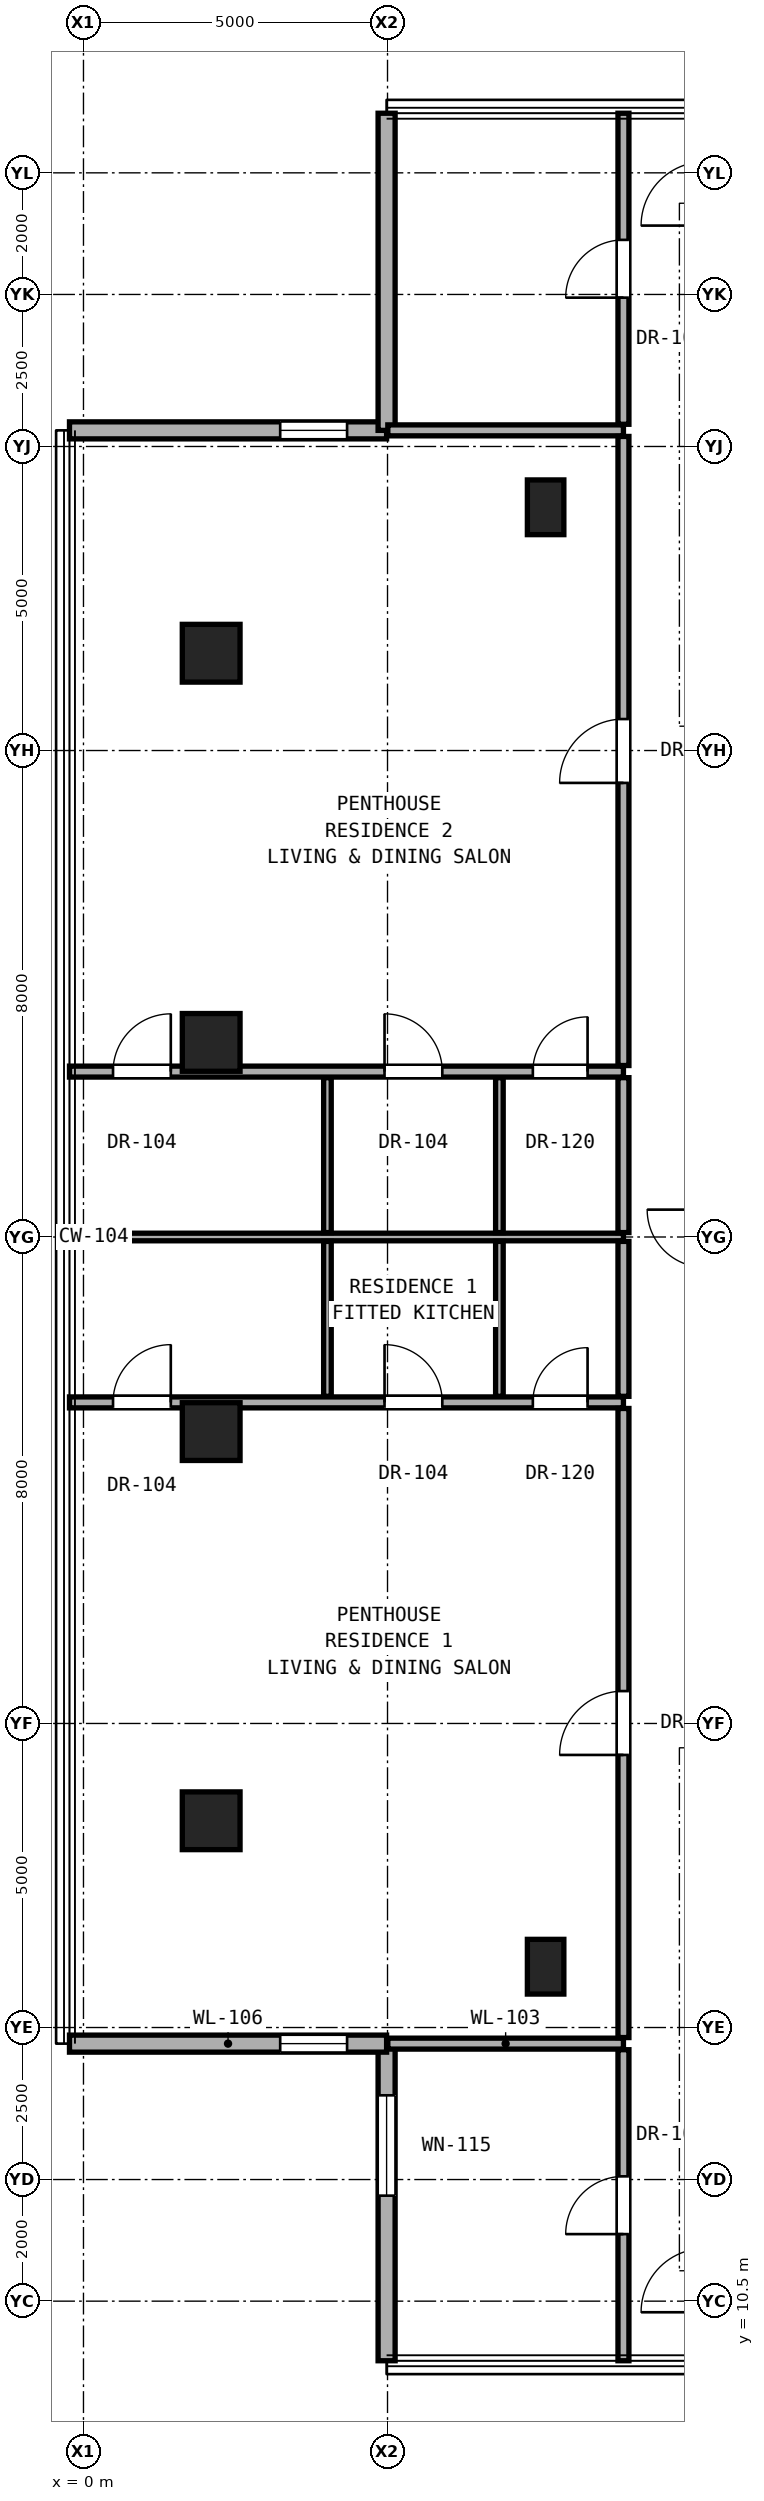
"""IFC4 building model, lengths in metres.
Left out: names, types, materials, properties, quantities, classifications, styles, units other than length and angle.
Written with IfcOpenShell. Run it as: python <this file> out.ifc"""

import sys

from ifc_helpers import new_model, si_unit, direction, frame, frame_2d, origin, origin_2d, place, context, subcontext, project, spatial, rectangle, hollow_rectangle, extrude, element, fill, save


model = new_model("IFC4")
c1 = context("Model", 3, precision=1e-05, world=origin(), true_north=direction((0.0, 1.0)))
c2 = subcontext(c1, "Body", "Model", "MODEL_VIEW")
j1 = project(units=[si_unit("LENGTHUNIT", "METRE"), si_unit("PLANEANGLEUNIT", "RADIAN")], contexts=[c1])
p1 = place(None, origin())
s1 = spatial("IfcSite", under=j1, at=p1, CompositionType="ELEMENT")
p2 = place(p1, origin())
s2 = spatial("IfcBuilding", under=s1, at=p2, CompositionType="ELEMENT")
p3 = place(p2, frame((0.0, 0.0, 199.9)))
s3 = spatial("IfcBuildingStorey", under=s2, at=p3, CompositionType="ELEMENT", Elevation=199.9)
for number, where, z_axis, x_axis in (
    (1, (2.1, 18.4, 0.0), (0.0, 0.0, 1.0), (1.0, 0.0, 0.0)),
    (2, (2.1, 24.8, 0.0), (0.0, 0.0, 1.0), (1.0, 0.0, 0.0)),
    (3, (2.1, 31.2, 0.0), (0.0, 0.0, 1.0), (1.0, 0.0, 0.0)),
    (4, (2.1, 37.6, 0.0), (0.0, 0.0, 1.0), (1.0, 0.0, 0.0)),
):
    element("IfcColumn", number, at=place(p3, frame(where, z_axis=z_axis, x_axis=x_axis)), inside=s3, PredefinedType="COLUMN", context=c2, shape_type="SweptSolid", body=[
        extrude(hollow_rectangle(XDim=0.95, YDim=0.95, WallThickness=0.05, at=origin_2d()), origin(), (0.0, 0.0, 1.0), 3.25),
    ])
for number, where, z_axis, x_axis in (
    (5, (7.6, 16.0, 0.0), (0.0, 0.0, 1.0), (1.0, 0.0, 0.0)),
    (6, (7.6, 40.0, 0.0), (0.0, 0.0, 1.0), (1.0, 0.0, 0.0)),
):
    element("IfcColumn", number, at=place(p3, frame(where, z_axis=z_axis, x_axis=x_axis)), inside=s3, PredefinedType="PILASTER", context=c2, shape_type="SweptSolid", body=[
        extrude(rectangle(XDim=0.6, YDim=0.9, at=origin_2d()), origin(), (0.0, 0.0, 1.0), 3.25),
    ])
p4 = place(p3, frame((4.985, 14.735, 0.0), z_axis=(0.0, 0.0, 1.0), x_axis=(0.0, -1.0, 0.0)))
e7 = element("IfcWall", 7, at=p4, inside=s3, PredefinedType="SOLIDWALL", context=c2, shape_type="SweptSolid", body=[
    extrude(rectangle(XDim=5.215, YDim=0.28, at=frame_2d((2.607, 0.0))), origin(), (0.0, 0.0, 1.0), 3.03),
])
p5 = place(p4, frame((0.85, 0.0, 0.68)))
e8 = element("IfcOpeningElement", 8, at=p5, cuts=e7, PredefinedType="OPENING", context=c2, shape_type="SweptSolid", body=[
    extrude(rectangle(XDim=1.65, YDim=2.2, at=frame_2d((0.825, 1.1))), frame((0.0, 0.15, 0.0), z_axis=(0.0, -1.0, 0.0), x_axis=(1.0, 0.0, 0.0)), (0.0, 0.0, 1.0), 0.3),
])
p6 = place(p3, frame((-0.23, 14.735, 0.0), z_axis=(0.0, 0.0, 1.0), x_axis=(1.0, 0.0, 0.0)))
e9 = element("IfcWall", 9, at=p6, inside=s3, PredefinedType="SOLIDWALL", context=c2, shape_type="SweptSolid", body=[
    extrude(rectangle(XDim=5.215, YDim=0.28, at=frame_2d((2.607, 0.0))), origin(), (0.0, 0.0, 1.0), 3.03),
])
p7 = place(p6, frame((3.465, 0.0, 0.85)))
e10 = element("IfcOpeningElement", 10, at=p7, cuts=e9, PredefinedType="OPENING", context=c2, shape_type="SweptSolid", body=[
    extrude(rectangle(XDim=1.1, YDim=2.0, at=frame_2d((0.55, 1.0))), frame((0.0, 0.15, 0.0), z_axis=(0.0, -1.0, 0.0), x_axis=(1.0, 0.0, 0.0)), (0.0, 0.0, 1.0), 0.3),
])
p8 = place(p3, frame((4.985, 41.265, 0.0), z_axis=(0.0, 0.0, 1.0), x_axis=(-1.0, 0.0, 0.0)))
e11 = element("IfcWall", 11, at=p8, inside=s3, PredefinedType="SOLIDWALL", context=c2, shape_type="SweptSolid", body=[
    extrude(rectangle(XDim=5.215, YDim=0.28, at=frame_2d((2.607, 0.0))), origin(), (0.0, 0.0, 1.0), 3.03),
])
p9 = place(p8, frame((0.65, 0.0, 0.85)))
e12 = element("IfcOpeningElement", 12, at=p9, cuts=e11, PredefinedType="OPENING", context=c2, shape_type="SweptSolid", body=[
    extrude(rectangle(XDim=1.1, YDim=2.0, at=frame_2d((0.55, 1.0))), frame((0.0, 0.15, 0.0), z_axis=(0.0, -1.0, 0.0), x_axis=(1.0, 0.0, 0.0)), (0.0, 0.0, 1.0), 0.3),
])
p10 = place(p3, frame((4.985, 46.48, 0.0), z_axis=(0.0, 0.0, 1.0), x_axis=(0.0, -1.0, 0.0)))
e13 = element("IfcWall", 13, at=p10, inside=s3, PredefinedType="SOLIDWALL", context=c2, shape_type="SweptSolid", body=[
    extrude(rectangle(XDim=5.215, YDim=0.28, at=frame_2d((2.607, 0.0))), origin(), (0.0, 0.0, 1.0), 3.03),
])
p11 = place(p3, frame((5.005, 14.735, 0.0), z_axis=(0.0, 0.0, 1.0), x_axis=(1.0, 0.0, 0.0)))
e14 = element("IfcWall", 14, at=p11, inside=s3, PredefinedType="PARTITIONING", context=c2, shape_type="SweptSolid", body=[
    extrude(rectangle(XDim=3.875, YDim=0.18, at=frame_2d((1.938, 0.0))), origin(), (0.0, 0.0, 1.0), 3.05),
])
p12 = place(p3, frame((-0.23, 25.28, 0.0), z_axis=(0.0, 0.0, 1.0), x_axis=(1.0, 0.0, 0.0)))
e15 = element("IfcWall", 15, at=p12, inside=s3, PredefinedType="PARTITIONING", context=c2, shape_type="SweptSolid", body=[
    extrude(rectangle(XDim=9.11, YDim=0.18, at=frame_2d((4.555, 0.0))), origin(), (0.0, 0.0, 1.0), 2.269),
])
p13 = place(p12, frame((0.716, 0.0, 0.0)))
e16 = element("IfcOpeningElement", 16, at=p13, cuts=e15, PredefinedType="OPENING", context=c2, shape_type="SweptSolid", body=[
    extrude(rectangle(XDim=0.95, YDim=2.15, at=frame_2d((0.475, 1.075))), frame((0.0, 0.1, 0.0), z_axis=(0.0, -1.0, 0.0), x_axis=(1.0, 0.0, 0.0)), (0.0, 0.0, 1.0), 0.2),
])
p14 = place(p12, frame((5.181, 0.0, 0.0)))
e17 = element("IfcOpeningElement", 17, at=p14, cuts=e15, PredefinedType="OPENING", context=c2, shape_type="SweptSolid", body=[
    extrude(rectangle(XDim=0.95, YDim=2.15, at=frame_2d((0.475, 1.075))), frame((0.0, 0.1, 0.0), z_axis=(0.0, -1.0, 0.0), x_axis=(1.0, 0.0, 0.0)), (0.0, 0.0, 1.0), 0.2),
])
p15 = place(p12, frame((7.62, 0.0, 0.0)))
e18 = element("IfcOpeningElement", 18, at=p15, cuts=e15, PredefinedType="OPENING", context=c2, shape_type="SweptSolid", body=[
    extrude(rectangle(XDim=0.9, YDim=2.1, at=frame_2d((0.45, 1.05))), frame((0.0, 0.1, 0.0), z_axis=(0.0, -1.0, 0.0), x_axis=(1.0, 0.0, 0.0)), (0.0, 0.0, 1.0), 0.2),
])
p16 = place(p3, frame((-0.23, 28.0, 0.0), z_axis=(0.0, 0.0, 1.0), x_axis=(1.0, 0.0, 0.0)))
e19 = element("IfcWall", 19, at=p16, inside=s3, PredefinedType="PARTITIONING", context=c2, shape_type="SweptSolid", body=[
    extrude(rectangle(XDim=9.11, YDim=0.125, at=frame_2d((4.555, 0.0))), origin(), (0.0, 0.0, 1.0), 2.269),
])
p17 = place(p3, frame((-0.23, 30.72, 0.0), z_axis=(0.0, 0.0, 1.0), x_axis=(1.0, 0.0, 0.0)))
e20 = element("IfcWall", 20, at=p17, inside=s3, PredefinedType="PARTITIONING", context=c2, shape_type="SweptSolid", body=[
    extrude(rectangle(XDim=9.11, YDim=0.18, at=frame_2d((4.555, 0.0))), origin(), (0.0, 0.0, 1.0), 2.269),
])
p18 = place(p17, frame((0.716, 0.0, 0.0)))
e21 = element("IfcOpeningElement", 21, at=p18, cuts=e20, PredefinedType="OPENING", context=c2, shape_type="SweptSolid", body=[
    extrude(rectangle(XDim=0.95, YDim=2.15, at=frame_2d((0.475, 1.075))), frame((0.0, 0.1, 0.0), z_axis=(0.0, -1.0, 0.0), x_axis=(1.0, 0.0, 0.0)), (0.0, 0.0, 1.0), 0.2),
])
p19 = place(p17, frame((5.181, 0.0, 0.0)))
e22 = element("IfcOpeningElement", 22, at=p19, cuts=e20, PredefinedType="OPENING", context=c2, shape_type="SweptSolid", body=[
    extrude(rectangle(XDim=0.95, YDim=2.15, at=frame_2d((0.475, 1.075))), frame((0.0, 0.1, 0.0), z_axis=(0.0, -1.0, 0.0), x_axis=(1.0, 0.0, 0.0)), (0.0, 0.0, 1.0), 0.2),
])
p20 = place(p17, frame((7.62, 0.0, 0.0)))
e23 = element("IfcOpeningElement", 23, at=p20, cuts=e20, PredefinedType="OPENING", context=c2, shape_type="SweptSolid", body=[
    extrude(rectangle(XDim=0.9, YDim=2.1, at=frame_2d((0.45, 1.05))), frame((0.0, 0.1, 0.0), z_axis=(0.0, -1.0, 0.0), x_axis=(1.0, 0.0, 0.0)), (0.0, 0.0, 1.0), 0.2),
])
p21 = place(p3, frame((5.005, 41.265, 0.0), z_axis=(0.0, 0.0, 1.0), x_axis=(1.0, 0.0, 0.0)))
e24 = element("IfcWall", 24, at=p21, inside=s3, PredefinedType="PARTITIONING", context=c2, shape_type="SweptSolid", body=[
    extrude(rectangle(XDim=3.875, YDim=0.18, at=frame_2d((1.938, 0.0))), origin(), (0.0, 0.0, 1.0), 3.05),
])
for number, where, z_axis, x_axis in (
    (25, (4.012, 25.38, 0.0), (0.0, 0.0, 1.0), (0.0, 1.0, 0.0)),
    (26, (4.012, 28.073, 0.0), (0.0, 0.0, 1.0), (0.0, 1.0, 0.0)),
    (27, (6.84, 25.38, 0.0), (0.0, 0.0, 1.0), (0.0, 1.0, 0.0)),
    (28, (6.84, 28.073, 0.0), (0.0, 0.0, 1.0), (0.0, 1.0, 0.0)),
):
    element("IfcWall", number, at=place(p3, frame(where, z_axis=z_axis, x_axis=x_axis)), inside=s3, PredefinedType="PARTITIONING", context=c2, shape_type="SweptSolid", body=[
        extrude(rectangle(XDim=2.548, YDim=0.125, at=frame_2d((1.274, 0.0))), origin(), (0.0, 0.0, 1.0), 3.05),
    ])
p22 = place(p3, frame((8.88, 9.52, 0.0), z_axis=(0.0, 0.0, 1.0), x_axis=(0.0, 1.0, 0.0)))
e29 = element("IfcWall", 29, at=p22, inside=s3, PredefinedType="PARTITIONING", context=c2, shape_type="SweptSolid", body=[
    extrude(rectangle(XDim=5.115, YDim=0.18, at=frame_2d((2.558, 0.0))), origin(), (0.0, 0.0, 1.0), 3.05),
])
p23 = place(p22, frame((2.083, 0.0, 0.0)))
e30 = element("IfcOpeningElement", 30, at=p23, cuts=e29, PredefinedType="OPENING", context=c2, shape_type="SweptSolid", body=[
    extrude(rectangle(XDim=0.95, YDim=2.15, at=frame_2d((0.475, 1.075))), frame((0.0, 0.1, 0.0), z_axis=(0.0, -1.0, 0.0), x_axis=(1.0, 0.0, 0.0)), (0.0, 0.0, 1.0), 0.2),
])
p24 = place(p3, frame((8.88, 14.835, 0.0), z_axis=(0.0, 0.0, 1.0), x_axis=(0.0, 1.0, 0.0)))
e31 = element("IfcWall", 31, at=p24, inside=s3, PredefinedType="PARTITIONING", context=c2, shape_type="SweptSolid", body=[
    extrude(rectangle(XDim=10.345, YDim=0.18, at=frame_2d((5.172, 0.0))), origin(), (0.0, 0.0, 1.0), 2.346),
])
p25 = place(p24, frame((4.647, 0.0, 0.0)))
e32 = element("IfcOpeningElement", 32, at=p25, cuts=e31, PredefinedType="OPENING", context=c2, shape_type="SweptSolid", body=[
    extrude(rectangle(XDim=1.05, YDim=2.2, at=frame_2d((0.525, 1.1))), frame((0.0, 0.1, 0.0), z_axis=(0.0, -1.0, 0.0), x_axis=(1.0, 0.0, 0.0)), (0.0, 0.0, 1.0), 0.2),
])
for number, where, z_axis, x_axis in (
    (33, (8.88, 25.38, 0.0), (0.0, 0.0, 1.0), (0.0, 1.0, 0.0)),
    (34, (8.88, 28.073, 0.0), (0.0, 0.0, 1.0), (0.0, 1.0, 0.0)),
):
    element("IfcWall", number, at=place(p3, frame(where, z_axis=z_axis, x_axis=x_axis)), inside=s3, PredefinedType="PARTITIONING", context=c2, shape_type="SweptSolid", body=[
        extrude(rectangle(XDim=2.548, YDim=0.18, at=frame_2d((1.274, 0.0))), origin(), (0.0, 0.0, 1.0), 3.05),
    ])
p26 = place(p3, frame((8.88, 30.82, 0.0), z_axis=(0.0, 0.0, 1.0), x_axis=(0.0, 1.0, 0.0)))
e35 = element("IfcWall", 35, at=p26, inside=s3, PredefinedType="PARTITIONING", context=c2, shape_type="SweptSolid", body=[
    extrude(rectangle(XDim=10.345, YDim=0.18, at=frame_2d((5.172, 0.0))), origin(), (0.0, 0.0, 1.0), 2.346),
])
p27 = place(p26, frame((4.647, 0.0, 0.0)))
e36 = element("IfcOpeningElement", 36, at=p27, cuts=e35, PredefinedType="OPENING", context=c2, shape_type="SweptSolid", body=[
    extrude(rectangle(XDim=1.05, YDim=2.2, at=frame_2d((0.525, 1.1))), frame((0.0, 0.1, 0.0), z_axis=(0.0, -1.0, 0.0), x_axis=(1.0, 0.0, 0.0)), (0.0, 0.0, 1.0), 0.2),
])
p28 = place(p3, frame((8.88, 41.365, 0.0), z_axis=(0.0, 0.0, 1.0), x_axis=(0.0, 1.0, 0.0)))
e37 = element("IfcWall", 37, at=p28, inside=s3, PredefinedType="PARTITIONING", context=c2, shape_type="SweptSolid", body=[
    extrude(rectangle(XDim=5.115, YDim=0.18, at=frame_2d((2.558, 0.0))), origin(), (0.0, 0.0, 1.0), 3.05),
])
p29 = place(p28, frame((2.083, 0.0, 0.0)))
e38 = element("IfcOpeningElement", 38, at=p29, cuts=e37, PredefinedType="OPENING", context=c2, shape_type="SweptSolid", body=[
    extrude(rectangle(XDim=0.95, YDim=2.15, at=frame_2d((0.475, 1.075))), frame((0.0, 0.1, 0.0), z_axis=(0.0, -1.0, 0.0), x_axis=(1.0, 0.0, 0.0)), (0.0, 0.0, 1.0), 0.2),
])
p30 = place(p5, origin())
e39 = element("IfcWindow", 39, at=p30, inside=s3, PartitioningType="SINGLE_PANEL", PredefinedType="WINDOW", context=c2, shape_type="SweptSolid", body=[
    extrude(rectangle(XDim=1.65, YDim=2.2, at=frame_2d((0.825, 1.1))), frame((0.0, 0.03, 0.0), z_axis=(0.0, -1.0, 0.0), x_axis=(1.0, 0.0, 0.0)), (0.0, 0.0, 1.0), 0.06),
])
fill(e8, e39)
p31 = place(p7, origin())
e40 = element("IfcWindow", 40, at=p31, inside=s3, PartitioningType="SINGLE_PANEL", PredefinedType="WINDOW", context=c2, shape_type="SweptSolid", body=[
    extrude(rectangle(XDim=1.1, YDim=2.0, at=frame_2d((0.55, 1.0))), frame((0.0, 0.03, 0.0), z_axis=(0.0, -1.0, 0.0), x_axis=(1.0, 0.0, 0.0)), (0.0, 0.0, 1.0), 0.06),
])
fill(e10, e40)
p32 = place(p9, origin())
e41 = element("IfcWindow", 41, at=p32, inside=s3, PartitioningType="SINGLE_PANEL", PredefinedType="WINDOW", context=c2, shape_type="SweptSolid", body=[
    extrude(rectangle(XDim=1.1, YDim=2.0, at=frame_2d((0.55, 1.0))), frame((0.0, 0.03, 0.0), z_axis=(0.0, -1.0, 0.0), x_axis=(1.0, 0.0, 0.0)), (0.0, 0.0, 1.0), 0.06),
])
fill(e12, e41)
p33 = place(p25, origin())
e42 = element("IfcDoor", 42, at=p33, inside=s3, OperationType="SINGLE_SWING_LEFT", PredefinedType="DOOR", context=c2, shape_type="SweptSolid", body=[
    extrude(rectangle(XDim=1.05, YDim=2.2, at=frame_2d((0.525, 1.1))), frame((0.0, 0.025, 0.0), z_axis=(0.0, -1.0, 0.0), x_axis=(1.0, 0.0, 0.0)), (0.0, 0.0, 1.0), 0.05),
])
fill(e32, e42)
p34 = place(p13, origin())
e43 = element("IfcDoor", 43, at=p34, inside=s3, OperationType="SINGLE_SWING_RIGHT", PredefinedType="DOOR", context=c2, shape_type="SweptSolid", body=[
    extrude(rectangle(XDim=0.95, YDim=2.15, at=frame_2d((0.475, 1.075))), frame((0.0, 0.025, 0.0), z_axis=(0.0, -1.0, 0.0), x_axis=(1.0, 0.0, 0.0)), (0.0, 0.0, 1.0), 0.05),
])
fill(e16, e43)
p35 = place(p14, origin())
e44 = element("IfcDoor", 44, at=p35, inside=s3, OperationType="SINGLE_SWING_LEFT", PredefinedType="DOOR", context=c2, shape_type="SweptSolid", body=[
    extrude(rectangle(XDim=0.95, YDim=2.15, at=frame_2d((0.475, 1.075))), frame((0.0, 0.025, 0.0), z_axis=(0.0, -1.0, 0.0), x_axis=(1.0, 0.0, 0.0)), (0.0, 0.0, 1.0), 0.05),
])
fill(e17, e44)
p36 = place(p15, origin())
e45 = element("IfcDoor", 45, at=p36, inside=s3, OperationType="SINGLE_SWING_RIGHT", PredefinedType="DOOR", context=c2, shape_type="SweptSolid", body=[
    extrude(rectangle(XDim=0.9, YDim=2.1, at=frame_2d((0.45, 1.05))), frame((0.0, 0.025, 0.0), z_axis=(0.0, -1.0, 0.0), x_axis=(1.0, 0.0, 0.0)), (0.0, 0.0, 1.0), 0.05),
])
fill(e18, e45)
p37 = place(p27, origin())
e46 = element("IfcDoor", 46, at=p37, inside=s3, OperationType="SINGLE_SWING_LEFT", PredefinedType="DOOR", context=c2, shape_type="SweptSolid", body=[
    extrude(rectangle(XDim=1.05, YDim=2.2, at=frame_2d((0.525, 1.1))), frame((0.0, 0.025, 0.0), z_axis=(0.0, -1.0, 0.0), x_axis=(1.0, 0.0, 0.0)), (0.0, 0.0, 1.0), 0.05),
])
fill(e36, e46)
p38 = place(p18, origin())
e47 = element("IfcDoor", 47, at=p38, inside=s3, OperationType="SINGLE_SWING_RIGHT", PredefinedType="DOOR", context=c2, shape_type="SweptSolid", body=[
    extrude(rectangle(XDim=0.95, YDim=2.15, at=frame_2d((0.475, 1.075))), frame((0.0, 0.025, 0.0), z_axis=(0.0, -1.0, 0.0), x_axis=(1.0, 0.0, 0.0)), (0.0, 0.0, 1.0), 0.05),
])
fill(e21, e47)
p39 = place(p19, origin())
e48 = element("IfcDoor", 48, at=p39, inside=s3, OperationType="SINGLE_SWING_LEFT", PredefinedType="DOOR", context=c2, shape_type="SweptSolid", body=[
    extrude(rectangle(XDim=0.95, YDim=2.15, at=frame_2d((0.475, 1.075))), frame((0.0, 0.025, 0.0), z_axis=(0.0, -1.0, 0.0), x_axis=(1.0, 0.0, 0.0)), (0.0, 0.0, 1.0), 0.05),
])
fill(e22, e48)
p40 = place(p20, origin())
e49 = element("IfcDoor", 49, at=p40, inside=s3, OperationType="SINGLE_SWING_RIGHT", PredefinedType="DOOR", context=c2, shape_type="SweptSolid", body=[
    extrude(rectangle(XDim=0.9, YDim=2.1, at=frame_2d((0.45, 1.05))), frame((0.0, 0.025, 0.0), z_axis=(0.0, -1.0, 0.0), x_axis=(1.0, 0.0, 0.0)), (0.0, 0.0, 1.0), 0.05),
])
fill(e23, e49)
p41 = place(p23, origin())
e50 = element("IfcDoor", 50, at=p41, inside=s3, OperationType="SINGLE_SWING_LEFT", PredefinedType="DOOR", context=c2, shape_type="SweptSolid", body=[
    extrude(rectangle(XDim=0.95, YDim=2.15, at=frame_2d((0.475, 1.075))), frame((0.0, 0.025, 0.0), z_axis=(0.0, -1.0, 0.0), x_axis=(1.0, 0.0, 0.0)), (0.0, 0.0, 1.0), 0.05),
])
fill(e30, e50)
p42 = place(p29, origin())
e51 = element("IfcDoor", 51, at=p42, inside=s3, OperationType="SINGLE_SWING_LEFT", PredefinedType="DOOR", context=c2, shape_type="SweptSolid", body=[
    extrude(rectangle(XDim=0.95, YDim=2.15, at=frame_2d((0.475, 1.075))), frame((0.0, 0.025, 0.0), z_axis=(0.0, -1.0, 0.0), x_axis=(1.0, 0.0, 0.0)), (0.0, 0.0, 1.0), 0.05),
])
fill(e38, e51)
save(model, sys.argv[1])
